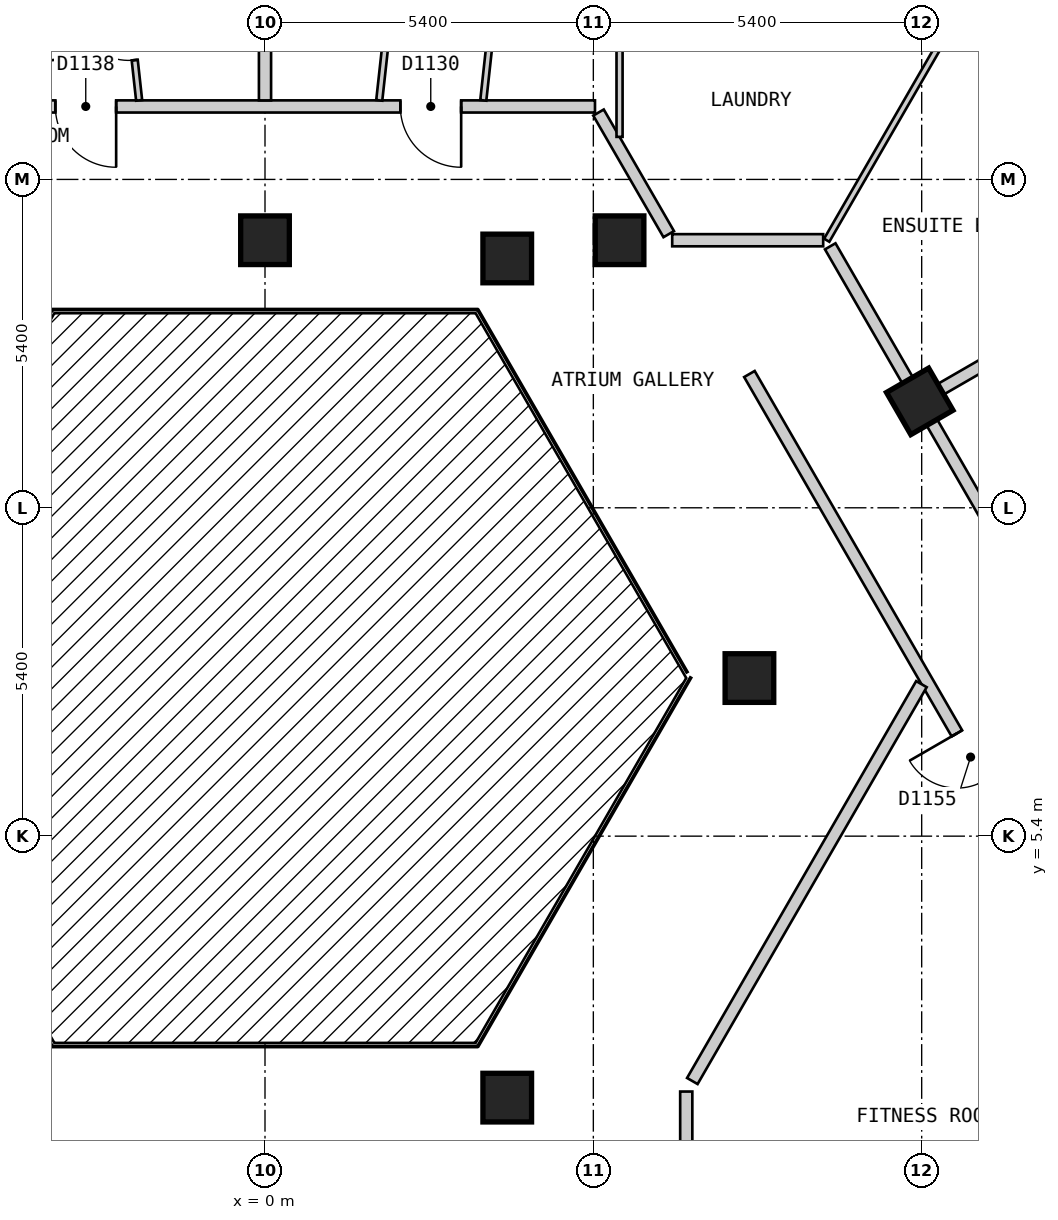
"""IFC4 building model, lengths in metres.
Left out: names, types, materials, properties, quantities, classifications, styles, units other than length and angle.
Written with IfcOpenShell. Run it as: python <this file> out.ifc"""

import sys

from ifc_helpers import new_model, si_unit, direction, frame, frame_2d, origin, origin_2d, place, context, subcontext, project, spatial, rectangle, extrude, element, fill, save


model = new_model("IFC4")
c1 = context("Model", 3, precision=1e-05, world=origin(), true_north=direction((0.0, 1.0)))
c2 = subcontext(c1, "Body", "Model", "MODEL_VIEW")
j1 = project(units=[si_unit("LENGTHUNIT", "METRE"), si_unit("PLANEANGLEUNIT", "RADIAN")], contexts=[c1])
p1 = place(None, origin())
s1 = spatial("IfcSite", under=j1, at=p1, CompositionType="ELEMENT")
p2 = place(p1, origin())
s2 = spatial("IfcBuilding", under=s1, at=p2, CompositionType="ELEMENT")
p3 = place(p2, frame((0.0, 0.0, 144.6)))
s3 = spatial("IfcBuildingStorey", under=s2, at=p3, CompositionType="ELEMENT", Elevation=144.6)
for number, where, z_axis, x_axis in (
    (1, (3.984, 1.1, 0.0), (0.0, 0.0, 1.0), (1.0, 0.0, 0.0)),
    (2, (7.967, 8.0, 0.0), (0.0, 0.0, 1.0), (1.0, 0.0, 0.0)),
    (3, (10.768, 12.55, 0.0), (0.0, 0.0, 1.0), (-0.5, 0.866, 0.0)),
    (4, (5.831, 15.2, 0.0), (0.0, 0.0, 1.0), (-1.0, 0.0, 0.0)),
    (5, (3.984, 14.9, 0.0), (0.0, 0.0, 1.0), (1.0, 0.0, 0.0)),
    (6, (0.0, 15.2, 0.0), (0.0, 0.0, 1.0), (-1.0, 0.0, 0.0)),
):
    element("IfcColumn", number, at=place(p3, frame(where, z_axis=z_axis, x_axis=x_axis)), inside=s3, PredefinedType="COLUMN", context=c2, shape_type="SweptSolid", body=[
        extrude(rectangle(XDim=0.8, YDim=0.8, at=origin_2d()), origin(), (0.0, 0.0, 1.0), 3.0),
    ])
p4 = place(p3, frame((5.485, 17.3, 0.0), z_axis=(0.0, 0.0, 1.0), x_axis=(0.500027479704, -0.866009537788, 0.0)))
e7 = element("IfcWall", 7, at=p4, inside=s3, PredefinedType="PARTITIONING", context=c2, shape_type="SweptSolid", body=[
    extrude(rectangle(XDim=2.309, YDim=0.2, at=frame_2d((1.155, 0.0))), origin(), (0.0, 0.0, 1.0), 2.7),
])
p5 = place(p3, frame((7.967, 13.0, 0.0), z_axis=(0.0, 0.0, 1.0), x_axis=(0.50003774998, -0.866003607726, 0.0)))
e8 = element("IfcWall", 8, at=p5, inside=s3, PredefinedType="PARTITIONING", context=c2, shape_type="SweptSolid", body=[
    extrude(rectangle(XDim=14.433, YDim=0.2, at=frame_2d((7.217, 0.0))), origin(), (0.0, 0.0, 1.0), 2.7),
])
p6 = place(p5, frame((6.824, 0.0, 0.0)))
e9 = element("IfcOpeningElement", 9, at=p6, cuts=e8, PredefinedType="OPENING", context=c2, shape_type="SweptSolid", body=[
    extrude(rectangle(XDim=0.9, YDim=2.1, at=frame_2d((0.45, 1.05))), frame((0.0, 0.11, 0.0), z_axis=(0.0, -1.0, 0.0), x_axis=(1.0, 0.0, 0.0)), (0.0, 0.0, 1.0), 0.22),
])
p7 = place(p3, frame((9.296, 15.1, 0.0), z_axis=(0.0, 0.0, 1.0), x_axis=(0.499974024244, -0.866040400375, 0.0)))
e10 = element("IfcWall", 10, at=p7, inside=s3, PredefinedType="PARTITIONING", context=c2, shape_type="SweptSolid", body=[
    extrude(rectangle(XDim=16.857, YDim=0.2, at=frame_2d((8.429, 0.0))), origin(), (0.0, 0.0, 1.0), 2.7),
])
p8 = place(p7, frame((11.522, 0.0, 0.0)))
e11 = element("IfcOpeningElement", 11, at=p8, cuts=e10, PredefinedType="OPENING", context=c2, shape_type="SweptSolid", body=[
    extrude(rectangle(XDim=1.0, YDim=2.1, at=frame_2d((0.5, 1.05))), frame((0.0, 0.11, 0.0), z_axis=(0.0, -1.0, 0.0), x_axis=(1.0, 0.0, 0.0)), (0.0, 0.0, 1.0), 0.22),
])
p9 = place(p3, frame((6.697, 15.2, 0.0), z_axis=(0.0, 0.0, 1.0), x_axis=(1.0, 0.0, 0.0)))
e12 = element("IfcWall", 12, at=p9, inside=s3, PredefinedType="PARTITIONING", context=c2, shape_type="SweptSolid", body=[
    extrude(rectangle(XDim=2.483, YDim=0.2, at=frame_2d((1.241, 0.0))), origin(), (0.0, 0.0, 1.0), 2.7),
])
p10 = place(p3, frame((-5.312, 17.4, 0.0), z_axis=(0.0, 0.0, 1.0), x_axis=(1.0, 0.0, 0.0)))
e13 = element("IfcWall", 13, at=p10, inside=s3, PredefinedType="PARTITIONING", context=c2, shape_type="SweptSolid", body=[
    extrude(rectangle(XDim=10.739, YDim=0.2, at=frame_2d((5.37, 0.0))), origin(), (0.0, 0.0, 1.0), 2.7),
])
p11 = place(p10, frame((7.538, 0.0, 0.0)))
e14 = element("IfcOpeningElement", 14, at=p11, cuts=e13, PredefinedType="OPENING", context=c2, shape_type="SweptSolid", body=[
    extrude(rectangle(XDim=1.0, YDim=2.1, at=frame_2d((0.5, 1.05))), frame((0.0, 0.11, 0.0), z_axis=(0.0, -1.0, 0.0), x_axis=(1.0, 0.0, 0.0)), (0.0, 0.0, 1.0), 0.22),
])
p12 = place(p10, frame((1.864, 0.0, 0.0)))
e15 = element("IfcOpeningElement", 15, at=p12, cuts=e13, PredefinedType="OPENING", context=c2, shape_type="SweptSolid", body=[
    extrude(rectangle(XDim=1.0, YDim=2.1, at=frame_2d((0.5, 1.05))), frame((0.0, 0.11, 0.0), z_axis=(0.0, -1.0, 0.0), x_axis=(1.0, 0.0, 0.0)), (0.0, 0.0, 1.0), 0.22),
])
p13 = place(p3, frame((7.028, 1.373, 0.0), z_axis=(0.0, 0.0, 1.0), x_axis=(0.499954271211, 0.866051803703, 0.0)))
e16 = element("IfcWall", 16, at=p13, inside=s3, PredefinedType="PARTITIONING", context=c2, shape_type="SweptSolid", body=[
    extrude(rectangle(XDim=7.536, YDim=0.2, at=frame_2d((3.768, 0.0))), origin(), (0.0, 0.0, 1.0), 2.7),
])
p14 = place(p3, frame((6.928, -2.8, 0.0), z_axis=(0.0, 0.0, 1.0), x_axis=(0.0, 1.0, 0.0)))
e17 = element("IfcWall", 17, at=p14, inside=s3, PredefinedType="PARTITIONING", context=c2, shape_type="SweptSolid", body=[
    extrude(rectangle(XDim=4.0, YDim=0.2, at=frame_2d((2.0, 0.0))), origin(), (0.0, 0.0, 1.0), 2.7),
])
p15 = place(p3, frame((11.713, 19.313, 0.0), z_axis=(0.0, 0.0, 1.0), x_axis=(0.499945064984, -0.866057118208, 0.0)))
e18 = element("IfcWall", 18, at=p15, inside=s3, PredefinedType="PARTITIONING", context=c2, shape_type="SweptSolid", body=[
    extrude(rectangle(XDim=5.285, YDim=0.1, at=frame_2d((2.642, 0.0))), origin(), (0.0, 0.0, 1.0), 2.7),
])
p16 = place(p15, frame((2.242, 0.0, 0.0)))
e19 = element("IfcOpeningElement", 19, at=p16, cuts=e18, PredefinedType="OPENING", context=c2, shape_type="SweptSolid", body=[
    extrude(rectangle(XDim=0.8, YDim=2.1, at=frame_2d((0.4, 1.05))), frame((0.0, 0.06, 0.0), z_axis=(0.0, -1.0, 0.0), x_axis=(1.0, 0.0, 0.0)), (0.0, 0.0, 1.0), 0.12),
])
p17 = place(p3, frame((-2.319, 19.77, 0.0), z_axis=(0.0, 0.0, 1.0), x_axis=(0.109046821538, -0.994036614372, 0.0)))
e20 = element("IfcWall", 20, at=p17, inside=s3, PredefinedType="PARTITIONING", context=c2, shape_type="SweptSolid", body=[
    extrude(rectangle(XDim=2.284, YDim=0.1, at=frame_2d((1.142, 0.0))), origin(), (0.0, 0.0, 1.0), 2.7),
])
p18 = place(p17, frame((0.717, 0.0, 0.0)))
e21 = element("IfcOpeningElement", 21, at=p18, cuts=e20, PredefinedType="OPENING", context=c2, shape_type="SweptSolid", body=[
    extrude(rectangle(XDim=0.9, YDim=2.1, at=frame_2d((0.45, 1.05))), frame((0.0, 0.06, 0.0), z_axis=(0.0, -1.0, 0.0), x_axis=(1.0, 0.0, 0.0)), (0.0, 0.0, 1.0), 0.12),
])
p19 = place(p3, frame((9.238, 15.2, 0.0), z_axis=(0.0, 0.0, 1.0), x_axis=(0.499988022762, 0.866032318735, 0.0)))
e22 = element("IfcWall", 22, at=p19, inside=s3, PredefinedType="PARTITIONING", context=c2, shape_type="SweptSolid", body=[
    extrude(rectangle(XDim=4.748, YDim=0.1, at=frame_2d((2.374, 0.0))), origin(), (0.0, 0.0, 1.0), 2.7),
])
p20 = place(p3, frame((3.59, 17.5, 0.0), z_axis=(0.0, 0.0, 1.0), x_axis=(0.108938463119, 0.994048495423, 0.0)))
e23 = element("IfcWall", 23, at=p20, inside=s3, PredefinedType="PARTITIONING", context=c2, shape_type="SweptSolid", body=[
    extrude(rectangle(XDim=4.074, YDim=0.1, at=frame_2d((2.037, 0.0))), origin(), (0.0, 0.0, 1.0), 2.7),
])
p21 = place(p20, frame((1.612, 0.0, 0.0)))
e24 = element("IfcOpeningElement", 24, at=p21, cuts=e23, PredefinedType="OPENING", context=c2, shape_type="SweptSolid", body=[
    extrude(rectangle(XDim=0.8, YDim=2.1, at=frame_2d((0.4, 1.05))), frame((0.0, 0.06, 0.0), z_axis=(0.0, -1.0, 0.0), x_axis=(1.0, 0.0, 0.0)), (0.0, 0.0, 1.0), 0.12),
])
p22 = place(p3, frame((1.879, 17.5, 0.0), z_axis=(0.0, 0.0, 1.0), x_axis=(0.10923450369, 0.994016007519, 0.0)))
e25 = element("IfcWall", 25, at=p22, inside=s3, PredefinedType="PARTITIONING", context=c2, shape_type="SweptSolid", body=[
    extrude(rectangle(XDim=4.074, YDim=0.1, at=frame_2d((2.037, 0.0))), origin(), (0.0, 0.0, 1.0), 2.7),
])
p23 = place(p22, frame((1.562, 0.0, 0.0)))
e26 = element("IfcOpeningElement", 26, at=p23, cuts=e25, PredefinedType="OPENING", context=c2, shape_type="SweptSolid", body=[
    extrude(rectangle(XDim=0.9, YDim=2.1, at=frame_2d((0.45, 1.05))), frame((0.0, 0.06, 0.0), z_axis=(0.0, -1.0, 0.0), x_axis=(1.0, 0.0, 0.0)), (0.0, 0.0, 1.0), 0.12),
])
p24 = place(p3, frame((5.831, 16.9, 0.0), z_axis=(0.0, 0.0, 1.0), x_axis=(0.0, 1.0, 0.0)))
e27 = element("IfcWall", 27, at=p24, inside=s3, PredefinedType="PARTITIONING", context=c2, shape_type="SweptSolid", body=[
    extrude(rectangle(XDim=4.65, YDim=0.1, at=frame_2d((2.325, 0.0))), origin(), (0.0, 0.0, 1.0), 2.7),
])
p25 = place(p3, frame((0.0, 17.5, 0.0), z_axis=(0.0, 0.0, 1.0), x_axis=(0.0, 1.0, 0.0)))
e28 = element("IfcWall", 28, at=p25, inside=s3, PredefinedType="PARTITIONING", context=c2, shape_type="SweptSolid", body=[
    extrude(rectangle(XDim=7.8, YDim=0.2, at=frame_2d((3.9, 0.0))), origin(), (0.0, 0.0, 1.0), 2.7),
])
p26 = place(p3, frame((10.854, 12.6, 0.0), z_axis=(0.0, 0.0, 1.0), x_axis=(0.866031112038, 0.499990112884, 0.0)))
e29 = element("IfcWall", 29, at=p26, inside=s3, PredefinedType="PARTITIONING", context=c2, shape_type="SweptSolid", body=[
    extrude(rectangle(XDim=3.948, YDim=0.2, at=frame_2d((1.974, 0.0))), origin(), (0.0, 0.0, 1.0), 2.7),
])
p27 = place(p11, origin())
e30 = element("IfcDoor", 30, at=p27, inside=s3, OperationType="SINGLE_SWING_RIGHT", PredefinedType="DOOR", context=c2, shape_type="SweptSolid", body=[
    extrude(rectangle(XDim=1.0, YDim=2.1, at=frame_2d((0.5, 1.05))), frame((0.0, 0.025, 0.0), z_axis=(0.0, -1.0, 0.0), x_axis=(1.0, 0.0, 0.0)), (0.0, 0.0, 1.0), 0.05),
])
fill(e14, e30)
p28 = place(p12, origin())
e31 = element("IfcDoor", 31, at=p28, inside=s3, OperationType="SINGLE_SWING_RIGHT", PredefinedType="DOOR", context=c2, shape_type="SweptSolid", body=[
    extrude(rectangle(XDim=1.0, YDim=2.1, at=frame_2d((0.5, 1.05))), frame((0.0, 0.025, 0.0), z_axis=(0.0, -1.0, 0.0), x_axis=(1.0, 0.0, 0.0)), (0.0, 0.0, 1.0), 0.05),
])
fill(e15, e31)
p29 = place(p18, origin())
e32 = element("IfcDoor", 32, at=p29, inside=s3, OperationType="SINGLE_SWING_LEFT", PredefinedType="DOOR", context=c2, shape_type="SweptSolid", body=[
    extrude(rectangle(XDim=0.9, YDim=2.1, at=frame_2d((0.45, 1.05))), frame((0.0, 0.025, 0.0), z_axis=(0.0, -1.0, 0.0), x_axis=(1.0, 0.0, 0.0)), (0.0, 0.0, 1.0), 0.05),
])
fill(e21, e32)
p30 = place(p6, origin())
e33 = element("IfcDoor", 33, at=p30, inside=s3, OperationType="SINGLE_SWING_LEFT", PredefinedType="DOOR", context=c2, shape_type="SweptSolid", body=[
    extrude(rectangle(XDim=0.9, YDim=2.1, at=frame_2d((0.45, 1.05))), frame((0.0, 0.025, 0.0), z_axis=(0.0, -1.0, 0.0), x_axis=(1.0, 0.0, 0.0)), (0.0, 0.0, 1.0), 0.05),
])
fill(e9, e33)
save(model, sys.argv[1])
